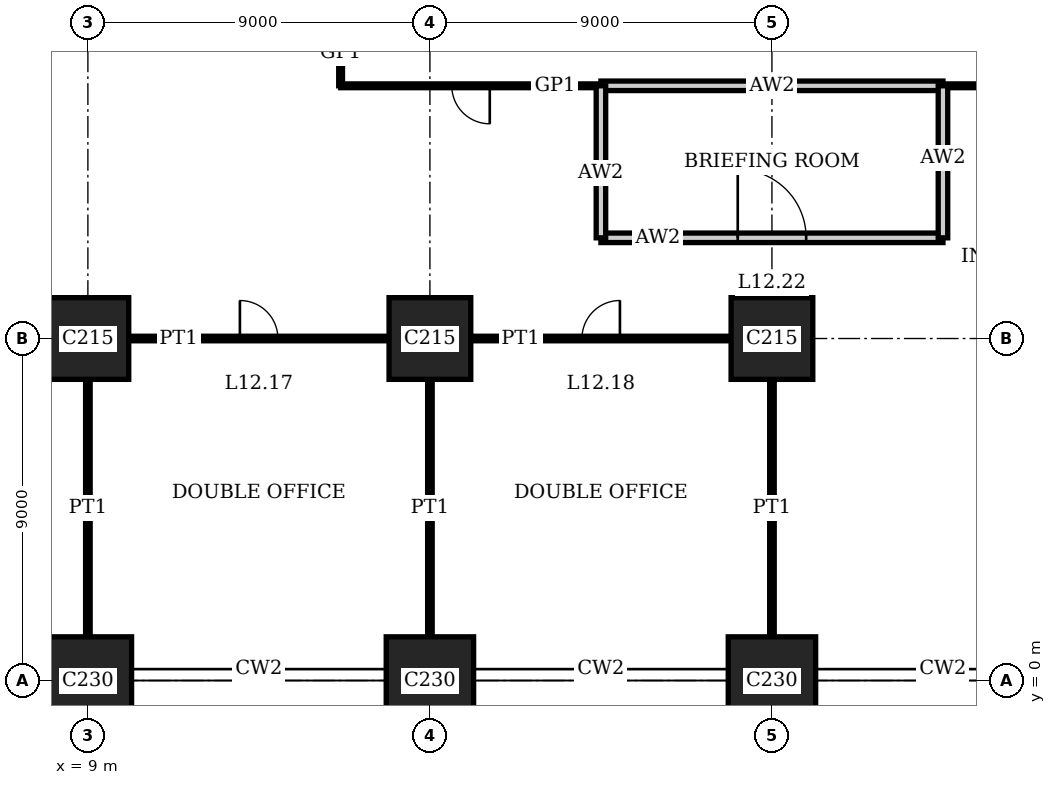
"""IFC4 building model, lengths in metres.
Left out: names, types, materials, properties, quantities, classifications, styles, units other than length and angle.
Written with IfcOpenShell. Run it as: python <this file> out.ifc"""

import sys

from ifc_helpers import new_model, si_unit, direction, frame, frame_2d, origin, origin_2d, place, context, subcontext, project, spatial, rectangle, extrude, element, fill, save


model = new_model("IFC4")
c1 = context("Model", 3, precision=1e-05, world=origin(), true_north=direction((0.0, 1.0)))
c2 = subcontext(c1, "Body", "Model", "MODEL_VIEW")
j1 = project(units=[si_unit("LENGTHUNIT", "METRE"), si_unit("PLANEANGLEUNIT", "RADIAN")], contexts=[c1])
p1 = place(None, origin())
s1 = spatial("IfcSite", under=j1, at=p1, CompositionType="ELEMENT")
p2 = place(p1, origin())
s2 = spatial("IfcBuilding", under=s1, at=p2, CompositionType="ELEMENT")
p3 = place(p2, frame((0.0, 0.0, 51.8)))
s3 = spatial("IfcBuildingStorey", under=s2, at=p3, CompositionType="ELEMENT", Elevation=51.8)
p4 = place(p3, frame((9.0, 0.0, 0.0), z_axis=(0.0, 0.0, 1.0), x_axis=(1.0, 0.0, 0.0)))
e1 = element("IfcColumn", 1, at=p4, inside=s3, PredefinedType="COLUMN", context=c2, shape_type="SweptSolid", body=[
    extrude(rectangle(XDim=2.3, YDim=2.3, at=origin_2d()), origin(), (0.0, 0.0, 1.0), 4.0),
])
p5 = place(p3, frame((9.0, 9.0, 0.0), z_axis=(0.0, 0.0, 1.0), x_axis=(1.0, 0.0, 0.0)))
e2 = element("IfcColumn", 2, at=p5, inside=s3, PredefinedType="COLUMN", context=c2, shape_type="SweptSolid", body=[
    extrude(rectangle(XDim=2.15, YDim=2.15, at=origin_2d()), origin(), (0.0, 0.0, 1.0), 4.0),
])
p6 = place(p3, frame((18.0, 0.0, 0.0), z_axis=(0.0, 0.0, 1.0), x_axis=(1.0, 0.0, 0.0)))
e3 = element("IfcColumn", 3, at=p6, inside=s3, PredefinedType="COLUMN", context=c2, shape_type="SweptSolid", body=[
    extrude(rectangle(XDim=2.3, YDim=2.3, at=origin_2d()), origin(), (0.0, 0.0, 1.0), 4.0),
])
p7 = place(p3, frame((18.0, 9.0, 0.0), z_axis=(0.0, 0.0, 1.0), x_axis=(1.0, 0.0, 0.0)))
e4 = element("IfcColumn", 4, at=p7, inside=s3, PredefinedType="COLUMN", context=c2, shape_type="SweptSolid", body=[
    extrude(rectangle(XDim=2.15, YDim=2.15, at=origin_2d()), origin(), (0.0, 0.0, 1.0), 4.0),
])
p8 = place(p3, frame((27.0, 0.0, 0.0), z_axis=(0.0, 0.0, 1.0), x_axis=(1.0, 0.0, 0.0)))
e5 = element("IfcColumn", 5, at=p8, inside=s3, PredefinedType="COLUMN", context=c2, shape_type="SweptSolid", body=[
    extrude(rectangle(XDim=2.3, YDim=2.3, at=origin_2d()), origin(), (0.0, 0.0, 1.0), 4.0),
])
p9 = place(p3, frame((27.0, 9.0, 0.0), z_axis=(0.0, 0.0, 1.0), x_axis=(1.0, 0.0, 0.0)))
e6 = element("IfcColumn", 6, at=p9, inside=s3, PredefinedType="COLUMN", context=c2, shape_type="SweptSolid", body=[
    extrude(rectangle(XDim=2.15, YDim=2.15, at=origin_2d()), origin(), (0.0, 0.0, 1.0), 4.0),
])
p10 = place(p3, frame((10.075, 9.0, 0.0), z_axis=(0.0, 0.0, 1.0), x_axis=(1.0, 0.0, 0.0)))
e7 = element("IfcWall", 7, at=p10, inside=s3, PredefinedType="PARTITIONING", context=c2, shape_type="SweptSolid", body=[
    extrude(rectangle(XDim=6.85, YDim=0.12, at=frame_2d((3.425, 0.0))), origin(), (0.0, 0.0, 1.0), 3.05),
])
p11 = place(p10, frame((2.925, 0.0, 0.0)))
e8 = element("IfcOpeningElement", 8, at=p11, cuts=e7, PredefinedType="OPENING", context=c2, shape_type="SweptSolid", body=[
    extrude(rectangle(XDim=1.0, YDim=2.4, at=frame_2d((0.5, 1.2))), frame((0.0, 0.07, 0.0), z_axis=(0.0, -1.0, 0.0), x_axis=(1.0, 0.0, 0.0)), (0.0, 0.0, 1.0), 0.14),
])
p12 = place(p3, frame((19.075, 9.0, 0.0), z_axis=(0.0, 0.0, 1.0), x_axis=(1.0, 0.0, 0.0)))
e9 = element("IfcWall", 9, at=p12, inside=s3, PredefinedType="PARTITIONING", context=c2, shape_type="SweptSolid", body=[
    extrude(rectangle(XDim=6.85, YDim=0.12, at=frame_2d((3.425, 0.0))), origin(), (0.0, 0.0, 1.0), 3.05),
])
p13 = place(p12, frame((2.925, 0.0, 0.0)))
e10 = element("IfcOpeningElement", 10, at=p13, cuts=e9, PredefinedType="OPENING", context=c2, shape_type="SweptSolid", body=[
    extrude(rectangle(XDim=1.0, YDim=2.4, at=frame_2d((0.5, 1.2))), frame((0.0, 0.07, 0.0), z_axis=(0.0, -1.0, 0.0), x_axis=(1.0, 0.0, 0.0)), (0.0, 0.0, 1.0), 0.14),
])
p14 = place(p3, frame((22.5, 11.65, 0.0), z_axis=(0.0, 0.0, 1.0), x_axis=(1.0, 0.0, 0.0)))
e11 = element("IfcWall", 11, at=p14, inside=s3, PredefinedType="PARTITIONING", context=c2, shape_type="SweptSolid", body=[
    extrude(rectangle(XDim=9.0, YDim=0.25, at=frame_2d((4.5, 0.0))), origin(), (0.0, 0.0, 1.0), 3.75),
])
p15 = place(p14, frame((3.6, 0.0, 0.0)))
e12 = element("IfcOpeningElement", 12, at=p15, cuts=e11, PredefinedType="OPENING", context=c2, shape_type="SweptSolid", body=[
    extrude(rectangle(XDim=1.8, YDim=2.4, at=frame_2d((0.9, 1.2))), frame((0.0, 0.135, 0.0), z_axis=(0.0, -1.0, 0.0), x_axis=(1.0, 0.0, 0.0)), (0.0, 0.0, 1.0), 0.27),
])
p16 = place(p3, frame((22.5, 15.65, 0.0), z_axis=(0.0, 0.0, 1.0), x_axis=(1.0, 0.0, 0.0)))
e13 = element("IfcWall", 13, at=p16, inside=s3, PredefinedType="PARTITIONING", context=c2, shape_type="SweptSolid", body=[
    extrude(rectangle(XDim=9.0, YDim=0.25, at=frame_2d((4.5, 0.0))), origin(), (0.0, 0.0, 1.0), 3.75),
])
p17 = place(p3, frame((15.65, 15.65, 0.0), z_axis=(0.0, 0.0, 1.0), x_axis=(1.0, 0.0, 0.0)))
e14 = element("IfcWall", 14, at=p17, inside=s3, PredefinedType="PARTITIONING", context=c2, shape_type="SweptSolid", body=[
    extrude(rectangle(XDim=6.85, YDim=0.1, at=frame_2d((3.425, 0.0))), origin(), (0.0, 0.0, 1.0), 3.75),
])
p18 = place(p17, frame((2.925, 0.0, 0.0)))
e15 = element("IfcOpeningElement", 15, at=p18, cuts=e14, PredefinedType="OPENING", context=c2, shape_type="SweptSolid", body=[
    extrude(rectangle(XDim=1.0, YDim=2.4, at=frame_2d((0.5, 1.2))), frame((0.0, 0.06, 0.0), z_axis=(0.0, -1.0, 0.0), x_axis=(1.0, 0.0, 0.0)), (0.0, 0.0, 1.0), 0.12),
])
p19 = place(p3, frame((31.5, 15.65, 0.0), z_axis=(0.0, 0.0, 1.0), x_axis=(1.0, 0.0, 0.0)))
e16 = element("IfcWall", 16, at=p19, inside=s3, PredefinedType="PARTITIONING", context=c2, shape_type="SweptSolid", body=[
    extrude(rectangle(XDim=15.85, YDim=0.1, at=frame_2d((7.925, 0.0))), origin(), (0.0, 0.0, 1.0), 3.75),
])
p20 = place(p3, frame((9.0, 1.15, 0.0), z_axis=(0.0, 0.0, 1.0), x_axis=(0.0, 1.0, 0.0)))
e17 = element("IfcWall", 17, at=p20, inside=s3, PredefinedType="PARTITIONING", context=c2, shape_type="SweptSolid", body=[
    extrude(rectangle(XDim=6.775, YDim=0.12, at=frame_2d((3.388, 0.0))), origin(), (0.0, 0.0, 1.0), 3.05),
])
p21 = place(p3, frame((15.65, 15.65, 0.0), z_axis=(0.0, 0.0, 1.0), x_axis=(0.0, 1.0, 0.0)))
e18 = element("IfcWall", 18, at=p21, inside=s3, PredefinedType="PARTITIONING", context=c2, shape_type="SweptSolid", body=[
    extrude(rectangle(XDim=2.35, YDim=0.1, at=frame_2d((1.175, 0.0))), origin(), (0.0, 0.0, 1.0), 3.75),
])
p22 = place(p3, frame((18.0, 1.15, 0.0), z_axis=(0.0, 0.0, 1.0), x_axis=(0.0, 1.0, 0.0)))
e19 = element("IfcWall", 19, at=p22, inside=s3, PredefinedType="PARTITIONING", context=c2, shape_type="SweptSolid", body=[
    extrude(rectangle(XDim=6.775, YDim=0.12, at=frame_2d((3.388, 0.0))), origin(), (0.0, 0.0, 1.0), 3.05),
])
p23 = place(p3, frame((22.5, 11.65, 0.0), z_axis=(0.0, 0.0, 1.0), x_axis=(0.0, 1.0, 0.0)))
e20 = element("IfcWall", 20, at=p23, inside=s3, PredefinedType="PARTITIONING", context=c2, shape_type="SweptSolid", body=[
    extrude(rectangle(XDim=4.0, YDim=0.25, at=frame_2d((2.0, 0.0))), origin(), (0.0, 0.0, 1.0), 3.75),
])
p24 = place(p3, frame((27.0, 1.15, 0.0), z_axis=(0.0, 0.0, 1.0), x_axis=(0.0, 1.0, 0.0)))
e21 = element("IfcWall", 21, at=p24, inside=s3, PredefinedType="PARTITIONING", context=c2, shape_type="SweptSolid", body=[
    extrude(rectangle(XDim=6.775, YDim=0.12, at=frame_2d((3.388, 0.0))), origin(), (0.0, 0.0, 1.0), 3.05),
])
p25 = place(p3, frame((31.5, 11.65, 0.0), z_axis=(0.0, 0.0, 1.0), x_axis=(0.0, 1.0, 0.0)))
e22 = element("IfcWall", 22, at=p25, inside=s3, PredefinedType="PARTITIONING", context=c2, shape_type="SweptSolid", body=[
    extrude(rectangle(XDim=4.0, YDim=0.25, at=frame_2d((2.0, 0.0))), origin(), (0.0, 0.0, 1.0), 3.75),
])
p26 = place(p11, origin())
e23 = element("IfcDoor", 23, at=p26, inside=s3, OperationType="SINGLE_SWING_RIGHT", PredefinedType="DOOR", context=c2, shape_type="SweptSolid", body=[
    extrude(rectangle(XDim=1.0, YDim=2.4, at=frame_2d((0.5, 1.2))), frame((0.0, 0.025, 0.0), z_axis=(0.0, -1.0, 0.0), x_axis=(1.0, 0.0, 0.0)), (0.0, 0.0, 1.0), 0.05),
])
fill(e8, e23)
p27 = place(p13, origin())
e24 = element("IfcDoor", 24, at=p27, inside=s3, OperationType="SINGLE_SWING_LEFT", PredefinedType="DOOR", context=c2, shape_type="SweptSolid", body=[
    extrude(rectangle(XDim=1.0, YDim=2.4, at=frame_2d((0.5, 1.2))), frame((0.0, 0.025, 0.0), z_axis=(0.0, -1.0, 0.0), x_axis=(1.0, 0.0, 0.0)), (0.0, 0.0, 1.0), 0.05),
])
fill(e10, e24)
p28 = place(p15, origin())
e25 = element("IfcDoor", 25, at=p28, inside=s3, OperationType="DOUBLE_DOOR_SINGLE_SWING", PredefinedType="DOOR", context=c2, shape_type="SweptSolid", body=[
    extrude(rectangle(XDim=1.8, YDim=2.4, at=frame_2d((0.9, 1.2))), frame((0.0, 0.025, 0.0), z_axis=(0.0, -1.0, 0.0), x_axis=(1.0, 0.0, 0.0)), (0.0, 0.0, 1.0), 0.05),
])
fill(e12, e25)
p29 = place(p18, origin())
e26 = element("IfcDoor", 26, at=p29, inside=s3, OperationType="SINGLE_SWING_RIGHT", PredefinedType="DOOR", context=c2, shape_type="SweptSolid", body=[
    extrude(rectangle(XDim=1.0, YDim=2.4, at=frame_2d((0.5, 1.2))), frame((0.0, 0.02, 0.0), z_axis=(0.0, -1.0, 0.0), x_axis=(1.0, 0.0, 0.0)), (0.0, 0.0, 1.0), 0.04),
])
fill(e15, e26)
save(model, sys.argv[1])
